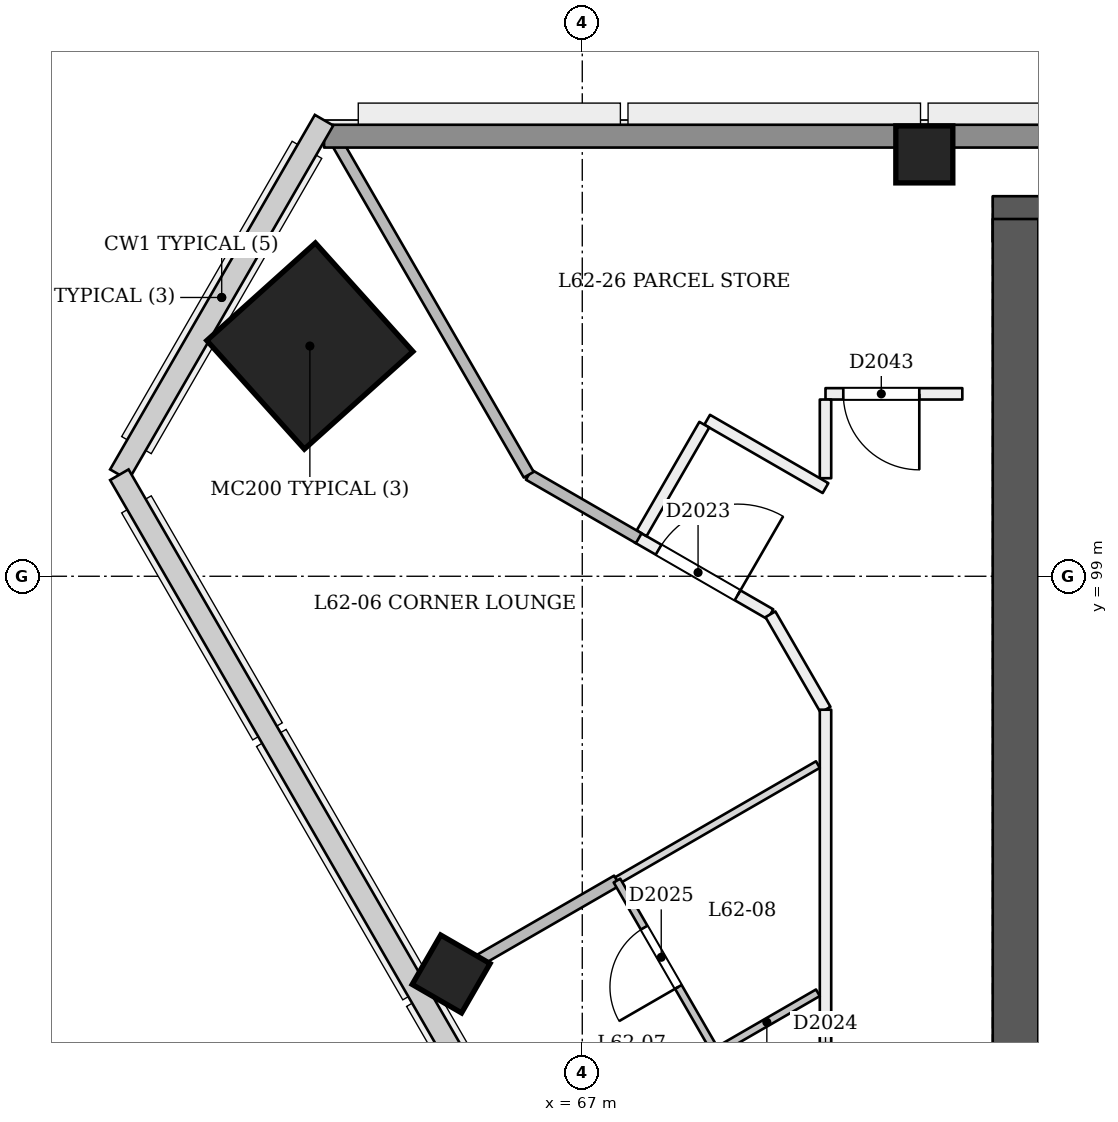
"""IFC4 building model, lengths in metres.
Left out: names, types, materials, properties, quantities, classifications, styles, units other than length and angle.
Written with IfcOpenShell. Run it as: python <this file> out.ifc"""

import sys

from ifc_helpers import new_model, si_unit, direction, frame, frame_2d, origin, origin_2d, place, context, subcontext, project, spatial, rectangle, extrude, element, fill, save


model = new_model("IFC4")
c1 = context("Model", 3, precision=1e-05, world=origin(), true_north=direction((0.0, 1.0)))
c2 = subcontext(c1, "Body", "Model", "MODEL_VIEW")
j1 = project(units=[si_unit("LENGTHUNIT", "METRE"), si_unit("PLANEANGLEUNIT", "RADIAN")], contexts=[c1])
p1 = place(None, origin())
s1 = spatial("IfcSite", under=j1, at=p1, CompositionType="ELEMENT")
p2 = place(p1, origin())
s2 = spatial("IfcBuilding", under=s1, at=p2, CompositionType="ELEMENT")
p3 = place(p2, frame((0.0, 0.0, 242.8)))
s3 = spatial("IfcBuildingStorey", under=s2, at=p3, CompositionType="ELEMENT", Elevation=242.8)
p4 = place(p3, frame((72.7, 93.1, 0.0), z_axis=(0.0, 0.0, 1.0), x_axis=(1.0, 0.0, 0.0)))
e1 = element("IfcWall", 1, at=p4, inside=s3, PredefinedType="SHEAR", context=c2, shape_type="SweptSolid", body=[
    extrude(rectangle(XDim=24.9, YDim=0.6, at=frame_2d((12.45, 0.0))), origin(), (0.0, 0.0, 1.0), 3.6),
])
p5 = place(p4, frame((1.1, 0.0, 0.0)))
e2 = element("IfcOpeningElement", 2, at=p5, cuts=e1, PredefinedType="OPENING", context=c2, shape_type="SweptSolid", body=[
    extrude(rectangle(XDim=1.2, YDim=2.1, at=frame_2d((0.6, 1.05))), frame((0.0, 0.311, 0.0), z_axis=(0.0, -1.0, 0.0), x_axis=(1.0, 0.0, 0.0)), (0.0, 0.0, 1.0), 0.621),
])
p6 = place(p4, frame((3.3, 0.0, 0.0)))
e3 = element("IfcOpeningElement", 3, at=p6, cuts=e1, PredefinedType="OPENING", context=c2, shape_type="SweptSolid", body=[
    extrude(rectangle(XDim=1.2, YDim=2.1, at=frame_2d((0.6, 1.05))), frame((0.0, 0.311, 0.0), z_axis=(0.0, -1.0, 0.0), x_axis=(1.0, 0.0, 0.0)), (0.0, 0.0, 1.0), 0.621),
])
p7 = place(p4, frame((13.3, 0.0, 0.0)))
e4 = element("IfcOpeningElement", 4, at=p7, cuts=e1, PredefinedType="OPENING", context=c2, shape_type="SweptSolid", body=[
    extrude(rectangle(XDim=1.2, YDim=2.1, at=frame_2d((0.6, 1.05))), frame((0.0, 0.311, 0.0), z_axis=(0.0, -1.0, 0.0), x_axis=(1.0, 0.0, 0.0)), (0.0, 0.0, 1.0), 0.621),
])
p8 = place(p4, frame((15.562, 0.0, 0.0)))
e5 = element("IfcOpeningElement", 5, at=p8, cuts=e1, PredefinedType="OPENING", context=c2, shape_type="SweptSolid", body=[
    extrude(rectangle(XDim=1.0, YDim=2.1, at=frame_2d((0.5, 1.05))), frame((0.0, 0.311, 0.0), z_axis=(0.0, -1.0, 0.0), x_axis=(1.0, 0.0, 0.0)), (0.0, 0.0, 1.0), 0.621),
])
p9 = place(p4, frame((18.2, 0.0, 0.0)))
e6 = element("IfcOpeningElement", 6, at=p9, cuts=e1, PredefinedType="OPENING", context=c2, shape_type="SweptSolid", body=[
    extrude(rectangle(XDim=1.0, YDim=2.1, at=frame_2d((0.5, 1.05))), frame((0.0, 0.311, 0.0), z_axis=(0.0, -1.0, 0.0), x_axis=(1.0, 0.0, 0.0)), (0.0, 0.0, 1.0), 0.621),
])
p10 = place(p4, frame((21.788, 0.0, 0.0)))
e7 = element("IfcOpeningElement", 7, at=p10, cuts=e1, PredefinedType="OPENING", context=c2, shape_type="SweptSolid", body=[
    extrude(rectangle(XDim=1.0, YDim=2.1, at=frame_2d((0.5, 1.05))), frame((0.0, 0.311, 0.0), z_axis=(0.0, -1.0, 0.0), x_axis=(1.0, 0.0, 0.0)), (0.0, 0.0, 1.0), 0.621),
])
p11 = place(p3, frame((97.3, 103.7, 0.0), z_axis=(0.0, 0.0, 1.0), x_axis=(-1.0, 0.0, 0.0)))
e8 = element("IfcWall", 8, at=p11, inside=s3, PredefinedType="SHEAR", context=c2, shape_type="SweptSolid", body=[
    extrude(rectangle(XDim=24.9, YDim=0.6, at=frame_2d((12.45, 0.0))), origin(), (0.0, 0.0, 1.0), 3.6),
])
p12 = place(p3, frame((72.7, 103.7, 0.0), z_axis=(0.0, 0.0, 1.0), x_axis=(0.0, -1.0, 0.0)))
e9 = element("IfcWall", 9, at=p12, inside=s3, PredefinedType="SHEAR", context=c2, shape_type="SweptSolid", body=[
    extrude(rectangle(XDim=10.9, YDim=0.6, at=frame_2d((5.45, 0.0))), origin(), (0.0, 0.0, 1.0), 3.6),
])
p13 = place(p3, frame((63.382, 102.018, 0.0), z_axis=(0.028403739082, 0.009219352065, 0.999554016126), x_axis=(-0.865127382623, 0.501154819451, 0.019961432206)))
e10 = element("IfcColumn", 10, at=p13, inside=s3, PredefinedType="COLUMN", context=c2, shape_type="SweptSolid", body=[
    extrude(rectangle(XDim=1.92, YDim=1.92, at=origin_2d()), origin(), (0.0, 0.0, 1.0), 3.602),
])
p14 = place(p3, frame((71.5, 104.55, 0.0), z_axis=(0.0, 0.0, 1.0), x_axis=(1.0, 0.0, 0.0)))
e11 = element("IfcColumn", 11, at=p14, inside=s3, PredefinedType="COLUMN", context=c2, shape_type="SweptSolid", body=[
    extrude(rectangle(XDim=0.75, YDim=0.75, at=origin_2d()), origin(), (0.0, 0.0, 1.0), 3.6),
])
p15 = place(p3, frame((65.248, 93.72, -0.023), z_axis=(0.022222852987, 0.038483477124, 0.999012095419), x_axis=(-0.865642058299, -0.49918203825, 0.038485316572)))
e12 = element("IfcColumn", 12, at=p15, inside=s3, PredefinedType="COLUMN", context=c2, shape_type="SweptSolid", body=[
    extrude(rectangle(XDim=0.75, YDim=0.75, at=origin_2d()), origin(), (0.0, 0.0, 1.0), 3.604),
])
p16 = place(p3, frame((67.726, 99.51, 0.0), z_axis=(0.0, 0.0, 1.0), x_axis=(0.866010470582, -0.500025864173, 0.0)))
e13 = element("IfcWall", 13, at=p16, inside=s3, PredefinedType="PARTITIONING", context=c2, shape_type="SweptSolid", body=[
    extrude(rectangle(XDim=2.02, YDim=0.15, at=frame_2d((1.01, 0.0))), origin(), (0.0, 0.0, 1.0), 3.2),
])
p17 = place(p16, frame((0.321, 0.0, 0.0)))
e14 = element("IfcOpeningElement", 14, at=p17, cuts=e13, PredefinedType="OPENING", context=c2, shape_type="SweptSolid", body=[
    extrude(rectangle(XDim=1.2, YDim=2.1, at=frame_2d((0.6, 1.05))), frame((0.0, 0.085, 0.0), z_axis=(0.0, -1.0, 0.0), x_axis=(1.0, 0.0, 0.0)), (0.0, 0.0, 1.0), 0.171),
])
p18 = place(p3, frame((69.475, 98.5, 0.0), z_axis=(0.0, 0.0, 1.0), x_axis=(0.499960540515, -0.86604818453, 0.0)))
e15 = element("IfcWall", 15, at=p18, inside=s3, PredefinedType="PARTITIONING", context=c2, shape_type="SweptSolid", body=[
    extrude(rectangle(XDim=1.45, YDim=0.15, at=frame_2d((0.725, 0.0))), origin(), (0.0, 0.0, 1.0), 3.2),
])
p19 = place(p3, frame((70.2, 97.244, 0.0), z_axis=(0.0, 0.0, 1.0), x_axis=(0.0, -1.0, 0.0)))
e16 = element("IfcWall", 16, at=p19, inside=s3, PredefinedType="PARTITIONING", context=c2, shape_type="SweptSolid", body=[
    extrude(rectangle(XDim=6.644, YDim=0.15, at=frame_2d((3.322, 0.0))), origin(), (0.0, 0.0, 1.0), 3.2),
])
p20 = place(p19, frame((4.388, 0.0, 0.0)))
e17 = element("IfcOpeningElement", 17, at=p20, cuts=e16, PredefinedType="OPENING", context=c2, shape_type="SweptSolid", body=[
    extrude(rectangle(XDim=1.1, YDim=2.1, at=frame_2d((0.55, 1.05))), frame((0.0, 0.085, 0.0), z_axis=(0.0, -1.0, 0.0), x_axis=(1.0, 0.0, 0.0)), (0.0, 0.0, 1.0), 0.171),
])
p21 = place(p3, frame((72.0, 101.4, 0.0), z_axis=(0.0, 0.0, 1.0), x_axis=(-1.0, 0.0, 0.0)))
e18 = element("IfcWall", 18, at=p21, inside=s3, PredefinedType="PARTITIONING", context=c2, shape_type="SweptSolid", body=[
    extrude(rectangle(XDim=1.8, YDim=0.15, at=frame_2d((0.9, 0.0))), origin(), (0.0, 0.0, 1.0), 3.2),
])
p22 = place(p21, frame((0.566, 0.0, 0.0)))
e19 = element("IfcOpeningElement", 19, at=p22, cuts=e18, PredefinedType="OPENING", context=c2, shape_type="SweptSolid", body=[
    extrude(rectangle(XDim=1.0, YDim=2.1, at=frame_2d((0.5, 1.05))), frame((0.0, 0.085, 0.0), z_axis=(0.0, -1.0, 0.0), x_axis=(1.0, 0.0, 0.0)), (0.0, 0.0, 1.0), 0.171),
])
p23 = place(p3, frame((70.2, 101.325, 0.0), z_axis=(0.0, 0.0, 1.0), x_axis=(0.0, -1.0, 0.0)))
e20 = element("IfcWall", 20, at=p23, inside=s3, PredefinedType="PARTITIONING", context=c2, shape_type="SweptSolid", body=[
    extrude(rectangle(XDim=1.035, YDim=0.15, at=frame_2d((0.518, 0.0))), origin(), (0.0, 0.0, 1.0), 3.2),
])
p24 = place(p3, frame((70.2, 100.16, 0.0), z_axis=(0.0, 0.0, 1.0), x_axis=(-0.866011447264, 0.500024172624, 0.0)))
e21 = element("IfcWall", 21, at=p24, inside=s3, PredefinedType="PARTITIONING", context=c2, shape_type="SweptSolid", body=[
    extrude(rectangle(XDim=1.798, YDim=0.15, at=frame_2d((0.899, 0.0))), origin(), (0.0, 0.0, 1.0), 3.2),
])
p25 = place(p3, frame((68.605, 100.994, 0.0), z_axis=(0.0, 0.0, 1.0), x_axis=(-0.499974350878, -0.866040211805, 0.0)))
e22 = element("IfcWall", 22, at=p25, inside=s3, PredefinedType="PARTITIONING", context=c2, shape_type="SweptSolid", body=[
    extrude(rectangle(XDim=1.65, YDim=0.15, at=frame_2d((0.825, 0.0))), origin(), (0.0, 0.0, 1.0), 3.2),
])
p26 = place(p3, frame((64.945, 93.546, 0.0), z_axis=(0.0, 0.0, 1.0), x_axis=(0.866032775405, 0.499987231761, 0.0)))
e23 = element("IfcWall", 23, at=p26, inside=s3, PredefinedType="PARTITIONING", context=c2, shape_type="SweptSolid", body=[
    extrude(rectangle(XDim=2.9, YDim=0.15, at=frame_2d((1.45, 0.0))), origin(), (0.0, 0.0, 1.0), 2.7),
])
p27 = place(p3, frame((67.457, 94.996, 0.0), z_axis=(0.0, 0.0, 1.0), x_axis=(0.866009774538, 0.500027069672, 0.0)))
e24 = element("IfcWall", 24, at=p27, inside=s3, PredefinedType="PARTITIONING", context=c2, shape_type="SweptSolid", body=[
    extrude(rectangle(XDim=3.052, YDim=0.1, at=frame_2d((1.526, 0.0))), origin(), (0.0, 0.0, 1.0), 3.2),
])
p28 = place(p3, frame((67.743, 99.5, 0.0), z_axis=(0.0, 0.0, 1.0), x_axis=(-0.866059082011, 0.499941663064, 0.0)))
e25 = element("IfcWall", 25, at=p28, inside=s3, PredefinedType="PARTITIONING", context=c2, shape_type="SweptSolid", body=[
    extrude(rectangle(XDim=1.671, YDim=0.15, at=frame_2d((0.835, 0.0))), origin(), (0.0, 0.0, 1.0), 3.2),
])
p29 = place(p3, frame((66.296, 100.335, 0.0), z_axis=(0.0, 0.0, 1.0), x_axis=(-0.499995114243, 0.866028224559, 0.0)))
e26 = element("IfcWall", 26, at=p29, inside=s3, PredefinedType="PARTITIONING", context=c2, shape_type="SweptSolid", body=[
    extrude(rectangle(XDim=5.271, YDim=0.15, at=frame_2d((2.635, 0.0))), origin(), (0.0, 0.0, 1.0), 2.7),
])
p30 = place(p3, frame((70.1, 93.521, 0.0), z_axis=(0.0, 0.0, 1.0), x_axis=(-0.865968060302, -0.500099308675, 0.0)))
e27 = element("IfcWall", 27, at=p30, inside=s3, PredefinedType="PARTITIONING", context=c2, shape_type="SweptSolid", body=[
    extrude(rectangle(XDim=1.552, YDim=0.1, at=frame_2d((0.776, 0.0))), origin(), (0.0, 0.0, 1.0), 3.2),
])
p31 = place(p3, frame((68.757, 92.745, 0.0), z_axis=(0.0, 0.0, 1.0), x_axis=(-0.500006934395, 0.866021400173, 0.0)))
e28 = element("IfcWall", 28, at=p31, inside=s3, PredefinedType="PARTITIONING", context=c2, shape_type="SweptSolid", body=[
    extrude(rectangle(XDim=2.6, YDim=0.1, at=frame_2d((1.3, 0.0))), origin(), (0.0, 0.0, 1.0), 3.2),
])
p32 = place(p31, frame((0.985, 0.0, 0.0)))
e29 = element("IfcOpeningElement", 29, at=p32, cuts=e28, PredefinedType="OPENING", context=c2, shape_type="SweptSolid", body=[
    extrude(rectangle(XDim=0.9, YDim=2.1, at=frame_2d((0.45, 1.05))), frame((0.0, 0.061, 0.0), z_axis=(0.0, -1.0, 0.0), x_axis=(1.0, 0.0, 0.0)), (0.0, 0.0, 1.0), 0.121),
])
p33 = place(p3, frame((63.603, 104.79, 0.0), z_axis=(0.0, 0.0, 1.0), x_axis=(1.0, 0.0, 0.0)))
e30 = element("IfcWall", 30, at=p33, inside=s3, PredefinedType="SOLIDWALL", context=c2, shape_type="SweptSolid", body=[
    extrude(rectangle(XDim=42.794, YDim=0.3, at=frame_2d((21.397, 0.0))), origin(), (0.0, 0.0, 1.0), 2.7),
])
p34 = place(p17, origin())
e31 = element("IfcDoor", 31, at=p34, inside=s3, OperationType="SINGLE_SWING_RIGHT", PredefinedType="NOTDEFINED", context=c2, shape_type="SweptSolid", body=[
    extrude(rectangle(XDim=1.2, YDim=2.1, at=frame_2d((0.6, 1.05))), frame((0.0, 0.025, 0.0), z_axis=(0.0, -1.0, 0.0), x_axis=(1.0, 0.0, 0.0)), (0.0, 0.0, 1.0), 0.05),
])
fill(e14, e31)
p35 = place(p32, origin())
e32 = element("IfcDoor", 32, at=p35, inside=s3, OperationType="SINGLE_SWING_LEFT", PredefinedType="NOTDEFINED", context=c2, shape_type="SweptSolid", body=[
    extrude(rectangle(XDim=0.9, YDim=2.1, at=frame_2d((0.45, 1.05))), frame((0.0, 0.025, 0.0), z_axis=(0.0, -1.0, 0.0), x_axis=(1.0, 0.0, 0.0)), (0.0, 0.0, 1.0), 0.05),
])
fill(e29, e32)
p36 = place(p22, origin())
e33 = element("IfcDoor", 33, at=p36, inside=s3, OperationType="SINGLE_SWING_LEFT", PredefinedType="NOTDEFINED", context=c2, shape_type="SweptSolid", body=[
    extrude(rectangle(XDim=1.0, YDim=2.1, at=frame_2d((0.5, 1.05))), frame((0.0, 0.025, 0.0), z_axis=(0.0, -1.0, 0.0), x_axis=(1.0, 0.0, 0.0)), (0.0, 0.0, 1.0), 0.05),
])
fill(e19, e33)
save(model, sys.argv[1])
